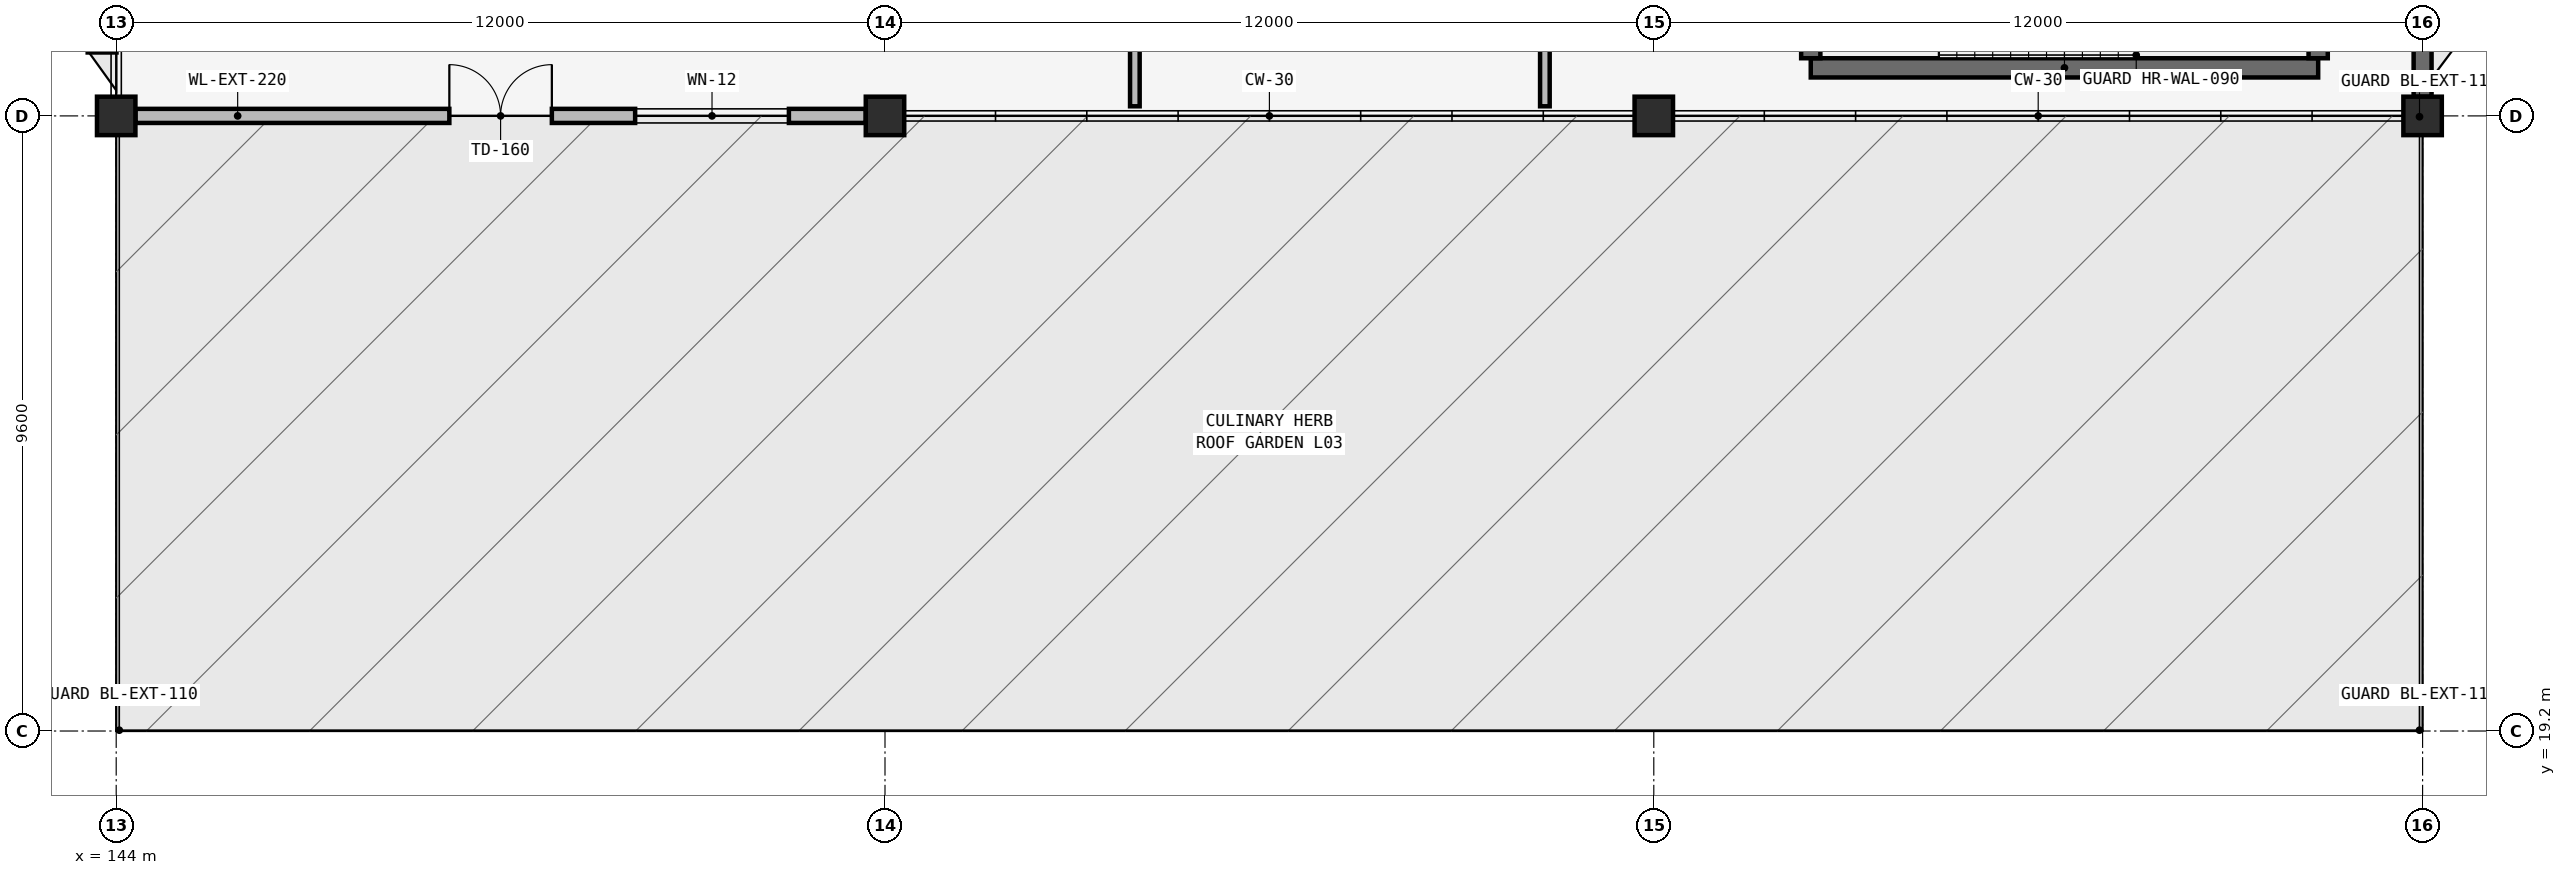
"""IFC4 building model, lengths in metres.
Left out: names, types, materials, properties, quantities, classifications, styles, units other than length and angle.
Written with IfcOpenShell. Run it as: python <this file> out.ifc"""

import sys

from ifc_helpers import new_model, si_unit, direction, frame, frame_2d, origin, origin_2d, place, context, subcontext, project, spatial, rectangle, extrude, element, fill, save


model = new_model("IFC4")
c1 = context("Model", 3, precision=1e-05, world=origin(), true_north=direction((0.0, 1.0)))
c2 = subcontext(c1, "Body", "Model", "MODEL_VIEW")
j1 = project(units=[si_unit("LENGTHUNIT", "METRE"), si_unit("PLANEANGLEUNIT", "RADIAN")], contexts=[c1])
p1 = place(None, origin())
s1 = spatial("IfcSite", under=j1, at=p1, CompositionType="ELEMENT")
p2 = place(p1, origin())
s2 = spatial("IfcBuilding", under=s1, at=p2, CompositionType="ELEMENT")
p3 = place(p2, frame((0.0, 0.0, 14.4)))
s3 = spatial("IfcBuildingStorey", under=s2, at=p3, CompositionType="ELEMENT", Elevation=14.4)
for number, where, z_axis, x_axis in (
    (1, (144.0, 28.8, 0.0), (0.0, 0.0, 1.0), (1.0, 0.0, 0.0)),
    (2, (156.0, 28.8, 0.0), (0.0, 0.0, 1.0), (1.0, 0.0, 0.0)),
    (3, (168.0, 28.8, 0.0), (0.0, 0.0, 1.0), (1.0, 0.0, 0.0)),
    (4, (180.0, 28.8, 0.0), (0.0, 0.0, 1.0), (1.0, 0.0, 0.0)),
):
    element("IfcColumn", number, at=place(p3, frame(where, z_axis=z_axis, x_axis=x_axis)), inside=s3, PredefinedType="COLUMN", context=c2, shape_type="SweptSolid", body=[
        extrude(rectangle(XDim=0.6, YDim=0.6, at=origin_2d()), origin(), (0.0, 0.0, 1.0), 4.2),
    ])
p4 = place(p3, frame((144.3, 28.8, 0.0), z_axis=(0.0, 0.0, 1.0), x_axis=(1.0, 0.0, 0.0)))
e5 = element("IfcWall", 5, at=p4, inside=s3, PredefinedType="SOLIDWALL", context=c2, shape_type="SweptSolid", body=[
    extrude(rectangle(XDim=11.4, YDim=0.22, at=frame_2d((5.7, 0.0))), origin(), (0.0, 0.0, 1.0), 3.301),
])
p5 = place(p4, frame((4.9, 0.0, 0.0)))
e6 = element("IfcOpeningElement", 6, at=p5, cuts=e5, PredefinedType="OPENING", context=c2, shape_type="SweptSolid", body=[
    extrude(rectangle(XDim=1.6, YDim=2.2, at=frame_2d((0.8, 1.1))), frame((0.0, 0.125, 0.0), z_axis=(0.0, -1.0, 0.0), x_axis=(1.0, 0.0, 0.0)), (0.0, 0.0, 1.0), 0.25),
])
p6 = place(p4, frame((7.8, 0.0, 0.8)))
e7 = element("IfcOpeningElement", 7, at=p6, cuts=e5, PredefinedType="OPENING", context=c2, shape_type="SweptSolid", body=[
    extrude(rectangle(XDim=2.4, YDim=2.1, at=frame_2d((1.2, 1.05))), frame((0.0, 0.125, 0.0), z_axis=(0.0, -1.0, 0.0), x_axis=(1.0, 0.0, 0.0)), (0.0, 0.0, 1.0), 0.25),
])
p7 = place(p3, frame((180.0, 29.1, 0.0), z_axis=(0.0, 0.0, 1.0), x_axis=(0.0, 1.0, 0.0)))
e8 = element("IfcWall", 8, at=p7, inside=s3, PredefinedType="SOLIDWALL", context=c2, shape_type="SweptSolid", body=[
    extrude(rectangle(XDim=9.0, YDim=0.28, at=frame_2d((4.5, 0.0))), origin(), (0.0, 0.0, 1.0), 3.9),
])
p8 = place(p3, frame((170.45, 29.55, 0.0), z_axis=(0.0, 0.0, 1.0), x_axis=(1.0, 0.0, 0.0)))
e9 = element("IfcWall", 9, at=p8, inside=s3, PredefinedType="SHEAR", context=c2, shape_type="SweptSolid", body=[
    extrude(rectangle(XDim=7.92, YDim=0.3, at=frame_2d((3.96, 0.0))), origin(), (0.0, 0.0, 1.0), 3.95),
])
for number, where, z_axis, x_axis in (
    (10, (170.45, 29.7, 0.0), (0.0, 0.0, 1.0), (0.0, 1.0, 0.0)),
    (11, (178.37, 29.7, 0.0), (0.0, 0.0, 1.0), (0.0, 1.0, 0.0)),
):
    element("IfcWall", number, at=place(p3, frame(where, z_axis=z_axis, x_axis=x_axis)), inside=s3, PredefinedType="SHEAR", context=c2, shape_type="SweptSolid", body=[
        extrude(rectangle(XDim=3.9, YDim=0.3, at=frame_2d((1.95, 0.0))), origin(), (0.0, 0.0, 1.0), 3.95),
    ])
p9 = place(p3, frame((159.9, 28.95, 0.0), z_axis=(0.0, 0.0, 1.0), x_axis=(0.0, 1.0, 0.0)))
e12 = element("IfcWall", 12, at=p9, inside=s3, PredefinedType="PARTITIONING", context=c2, shape_type="SweptSolid", body=[
    extrude(rectangle(XDim=10.05, YDim=0.15, at=frame_2d((5.025, 0.0))), origin(), (0.0, 0.0, 1.0), 3.95),
])
p10 = place(p9, frame((4.2, 0.0, 0.0)))
e13 = element("IfcOpeningElement", 13, at=p10, cuts=e12, PredefinedType="OPENING", context=c2, shape_type="SweptSolid", body=[
    extrude(rectangle(XDim=1.65, YDim=2.2, at=frame_2d((0.825, 1.1))), frame((0.0, 0.09, 0.0), z_axis=(0.0, -1.0, 0.0), x_axis=(1.0, 0.0, 0.0)), (0.0, 0.0, 1.0), 0.18),
])
p11 = place(p3, frame((166.3, 28.95, 0.0), z_axis=(0.0, 0.0, 1.0), x_axis=(0.0, 1.0, 0.0)))
e14 = element("IfcWall", 14, at=p11, inside=s3, PredefinedType="PARTITIONING", context=c2, shape_type="SweptSolid", body=[
    extrude(rectangle(XDim=13.15, YDim=0.15, at=frame_2d((6.575, 0.0))), origin(), (0.0, 0.0, 1.0), 3.95),
])
p12 = place(p11, frame((5.715, 0.0, 0.0)))
e15 = element("IfcOpeningElement", 15, at=p12, cuts=e14, PredefinedType="OPENING", context=c2, shape_type="SweptSolid", body=[
    extrude(rectangle(XDim=1.72, YDim=2.28, at=frame_2d((0.86, 1.14))), frame((0.0, 0.09, 0.0), z_axis=(0.0, -1.0, 0.0), x_axis=(1.0, 0.0, 0.0)), (0.0, 0.0, 1.0), 0.18),
])
p13 = place(p5, frame((1.6, 0.0, 0.0), z_axis=(0.0, 0.0, 1.0), x_axis=(-1.0, 0.0, 0.0)))
e16 = element("IfcDoor", 16, at=p13, inside=s3, OperationType="DOUBLE_DOOR_SINGLE_SWING", PredefinedType="DOOR", context=c2, shape_type="SweptSolid", body=[
    extrude(rectangle(XDim=1.6, YDim=2.2, at=frame_2d((0.8, 1.1))), frame((0.0, 0.025, 0.0), z_axis=(0.0, -1.0, 0.0), x_axis=(1.0, 0.0, 0.0)), (0.0, 0.0, 1.0), 0.05),
])
fill(e6, e16)
p14 = place(p6, origin())
e17 = element("IfcWindow", 17, at=p14, inside=s3, PartitioningType="SINGLE_PANEL", PredefinedType="WINDOW", context=c2, shape_type="SweptSolid", body=[
    extrude(rectangle(XDim=2.4, YDim=2.1, at=frame_2d((1.2, 1.05))), frame((0.0, 0.03, 0.0), z_axis=(0.0, -1.0, 0.0), x_axis=(1.0, 0.0, 0.0)), (0.0, 0.0, 1.0), 0.06),
])
fill(e7, e17)
save(model, sys.argv[1])
